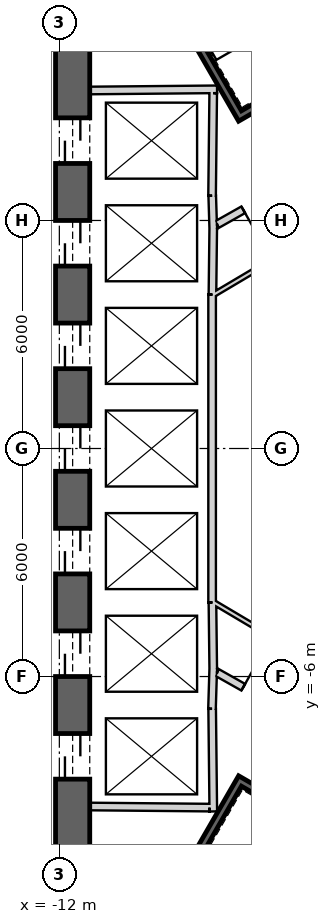
"""IFC4 building model, lengths in metres.
Left out: names, types, materials, properties, quantities, classifications, styles, units other than length and angle.
Written with IfcOpenShell. Run it as: python <this file> out.ifc"""

import sys

from ifc_helpers import new_model, si_unit, direction, frame, frame_2d, origin, place, context, subcontext, project, spatial, rectangle, extrude, element, fill, save


model = new_model("IFC4")
c1 = context("Model", 3, precision=1e-05, world=origin(), true_north=direction((0.0, 1.0)))
c2 = subcontext(c1, "Body", "Model", "MODEL_VIEW")
j1 = project(units=[si_unit("LENGTHUNIT", "METRE"), si_unit("PLANEANGLEUNIT", "RADIAN")], contexts=[c1])
p1 = place(None, origin())
s1 = spatial("IfcSite", under=j1, at=p1, CompositionType="ELEMENT")
p2 = place(p1, origin())
s2 = spatial("IfcBuilding", under=s1, at=p2, CompositionType="ELEMENT")
p3 = place(p2, frame((0.0, 0.0, 193.2)))
s3 = spatial("IfcBuildingStorey", under=s2, at=p3, CompositionType="ELEMENT", Elevation=193.2)
p4 = place(p3, frame((19.475, 2.208, 0.0), z_axis=(0.0, 0.0, 1.0), x_axis=(-0.866028369851, 0.499994862586, 0.0)))
e1 = element("IfcWall", 1, at=p4, inside=s3, PredefinedType="SHEAR", context=c2, shape_type="SweptSolid", body=[
    extrude(rectangle(XDim=31.523, YDim=0.9, at=frame_2d((15.762, 0.0))), origin(), (0.0, 0.0, 1.0), 4.0),
])
p5 = place(p4, frame((7.062, 0.0, 0.0)))
e2 = element("IfcOpeningElement", 2, at=p5, cuts=e1, PredefinedType="OPENING", context=c2, shape_type="SweptSolid", body=[
    extrude(rectangle(XDim=1.2, YDim=2.4, at=frame_2d((0.6, 1.2))), frame((0.0, 0.46, 0.0), z_axis=(0.0, -1.0, 0.0), x_axis=(1.0, 0.0, 0.0)), (0.0, 0.0, 1.0), 0.92),
])
p6 = place(p4, frame((3.612, 0.0, 0.0)))
e3 = element("IfcOpeningElement", 3, at=p6, cuts=e1, PredefinedType="OPENING", context=c2, shape_type="SweptSolid", body=[
    extrude(rectangle(XDim=1.2, YDim=2.4, at=frame_2d((0.6, 1.2))), frame((0.0, 0.46, 0.0), z_axis=(0.0, -1.0, 0.0), x_axis=(1.0, 0.0, 0.0)), (0.0, 0.0, 1.0), 0.92),
])
p7 = place(p4, frame((26.712, 0.0, 0.0)))
e4 = element("IfcOpeningElement", 4, at=p7, cuts=e1, PredefinedType="OPENING", context=c2, shape_type="SweptSolid", body=[
    extrude(rectangle(XDim=1.2, YDim=2.4, at=frame_2d((0.6, 1.2))), frame((0.0, 0.46, 0.0), z_axis=(0.0, -1.0, 0.0), x_axis=(1.0, 0.0, 0.0)), (0.0, 0.0, 1.0), 0.92),
])
p8 = place(p3, frame((-11.65, 15.762, 0.0), z_axis=(0.0, 0.0, 1.0), x_axis=(0.0, -1.0, 0.0)))
e5 = element("IfcWall", 5, at=p8, inside=s3, PredefinedType="SHEAR", context=c2, shape_type="SweptSolid", body=[
    extrude(rectangle(XDim=31.523, YDim=0.9, at=frame_2d((15.762, 0.0))), origin(), (0.0, 0.0, 1.0), 4.0),
])
p9 = place(p8, frame((7.062, 0.0, 0.0)))
e6 = element("IfcOpeningElement", 6, at=p9, cuts=e5, PredefinedType="OPENING", context=c2, shape_type="SweptSolid", body=[
    extrude(rectangle(XDim=1.2, YDim=2.4, at=frame_2d((0.6, 1.2))), frame((0.0, 0.46, 0.0), z_axis=(0.0, -1.0, 0.0), x_axis=(1.0, 0.0, 0.0)), (0.0, 0.0, 1.0), 0.92),
])
p10 = place(p8, frame((9.762, 0.0, 0.0)))
e7 = element("IfcOpeningElement", 7, at=p10, cuts=e5, PredefinedType="OPENING", context=c2, shape_type="SweptSolid", body=[
    extrude(rectangle(XDim=1.2, YDim=2.4, at=frame_2d((0.6, 1.2))), frame((0.0, 0.46, 0.0), z_axis=(0.0, -1.0, 0.0), x_axis=(1.0, 0.0, 0.0)), (0.0, 0.0, 1.0), 0.92),
])
p11 = place(p8, frame((12.462, 0.0, 0.0)))
e8 = element("IfcOpeningElement", 8, at=p11, cuts=e5, PredefinedType="OPENING", context=c2, shape_type="SweptSolid", body=[
    extrude(rectangle(XDim=1.2, YDim=2.4, at=frame_2d((0.6, 1.2))), frame((0.0, 0.46, 0.0), z_axis=(0.0, -1.0, 0.0), x_axis=(1.0, 0.0, 0.0)), (0.0, 0.0, 1.0), 0.92),
])
p12 = place(p8, frame((15.162, 0.0, 0.0)))
e9 = element("IfcOpeningElement", 9, at=p12, cuts=e5, PredefinedType="OPENING", context=c2, shape_type="SweptSolid", body=[
    extrude(rectangle(XDim=1.2, YDim=2.4, at=frame_2d((0.6, 1.2))), frame((0.0, 0.46, 0.0), z_axis=(0.0, -1.0, 0.0), x_axis=(1.0, 0.0, 0.0)), (0.0, 0.0, 1.0), 0.92),
])
p13 = place(p8, frame((17.862, 0.0, 0.0)))
e10 = element("IfcOpeningElement", 10, at=p13, cuts=e5, PredefinedType="OPENING", context=c2, shape_type="SweptSolid", body=[
    extrude(rectangle(XDim=1.2, YDim=2.4, at=frame_2d((0.6, 1.2))), frame((0.0, 0.46, 0.0), z_axis=(0.0, -1.0, 0.0), x_axis=(1.0, 0.0, 0.0)), (0.0, 0.0, 1.0), 0.92),
])
p14 = place(p8, frame((20.562, 0.0, 0.0)))
e11 = element("IfcOpeningElement", 11, at=p14, cuts=e5, PredefinedType="OPENING", context=c2, shape_type="SweptSolid", body=[
    extrude(rectangle(XDim=1.2, YDim=2.4, at=frame_2d((0.6, 1.2))), frame((0.0, 0.46, 0.0), z_axis=(0.0, -1.0, 0.0), x_axis=(1.0, 0.0, 0.0)), (0.0, 0.0, 1.0), 0.92),
])
p15 = place(p8, frame((23.262, 0.0, 0.0)))
e12 = element("IfcOpeningElement", 12, at=p15, cuts=e5, PredefinedType="OPENING", context=c2, shape_type="SweptSolid", body=[
    extrude(rectangle(XDim=1.2, YDim=2.4, at=frame_2d((0.6, 1.2))), frame((0.0, 0.46, 0.0), z_axis=(0.0, -1.0, 0.0), x_axis=(1.0, 0.0, 0.0)), (0.0, 0.0, 1.0), 0.92),
])
p16 = place(p8, frame((3.612, 0.0, 0.0)))
e13 = element("IfcOpeningElement", 13, at=p16, cuts=e5, PredefinedType="OPENING", context=c2, shape_type="SweptSolid", body=[
    extrude(rectangle(XDim=1.2, YDim=2.4, at=frame_2d((0.6, 1.2))), frame((0.0, 0.46, 0.0), z_axis=(0.0, -1.0, 0.0), x_axis=(1.0, 0.0, 0.0)), (0.0, 0.0, 1.0), 0.92),
])
p17 = place(p8, frame((26.712, 0.0, 0.0)))
e14 = element("IfcOpeningElement", 14, at=p17, cuts=e5, PredefinedType="OPENING", context=c2, shape_type="SweptSolid", body=[
    extrude(rectangle(XDim=1.2, YDim=2.4, at=frame_2d((0.6, 1.2))), frame((0.0, 0.46, 0.0), z_axis=(0.0, -1.0, 0.0), x_axis=(1.0, 0.0, 0.0)), (0.0, 0.0, 1.0), 0.92),
])
p18 = place(p3, frame((-7.825, -17.97, 0.0), z_axis=(0.0, 0.0, 1.0), x_axis=(0.866028369851, 0.499994862586, 0.0)))
e15 = element("IfcWall", 15, at=p18, inside=s3, PredefinedType="SHEAR", context=c2, shape_type="SweptSolid", body=[
    extrude(rectangle(XDim=31.523, YDim=0.9, at=frame_2d((15.762, 0.0))), origin(), (0.0, 0.0, 1.0), 4.0),
])
p19 = place(p18, frame((7.062, 0.0, 0.0)))
e16 = element("IfcOpeningElement", 16, at=p19, cuts=e15, PredefinedType="OPENING", context=c2, shape_type="SweptSolid", body=[
    extrude(rectangle(XDim=1.2, YDim=2.4, at=frame_2d((0.6, 1.2))), frame((0.0, 0.46, 0.0), z_axis=(0.0, -1.0, 0.0), x_axis=(1.0, 0.0, 0.0)), (0.0, 0.0, 1.0), 0.92),
])
p20 = place(p18, frame((9.762, 0.0, 0.0)))
e17 = element("IfcOpeningElement", 17, at=p20, cuts=e15, PredefinedType="OPENING", context=c2, shape_type="SweptSolid", body=[
    extrude(rectangle(XDim=1.2, YDim=2.4, at=frame_2d((0.6, 1.2))), frame((0.0, 0.46, 0.0), z_axis=(0.0, -1.0, 0.0), x_axis=(1.0, 0.0, 0.0)), (0.0, 0.0, 1.0), 0.92),
])
p21 = place(p18, frame((12.462, 0.0, 0.0)))
e18 = element("IfcOpeningElement", 18, at=p21, cuts=e15, PredefinedType="OPENING", context=c2, shape_type="SweptSolid", body=[
    extrude(rectangle(XDim=1.2, YDim=2.4, at=frame_2d((0.6, 1.2))), frame((0.0, 0.46, 0.0), z_axis=(0.0, -1.0, 0.0), x_axis=(1.0, 0.0, 0.0)), (0.0, 0.0, 1.0), 0.92),
])
p22 = place(p18, frame((15.162, 0.0, 0.0)))
e19 = element("IfcOpeningElement", 19, at=p22, cuts=e15, PredefinedType="OPENING", context=c2, shape_type="SweptSolid", body=[
    extrude(rectangle(XDim=1.2, YDim=2.4, at=frame_2d((0.6, 1.2))), frame((0.0, 0.46, 0.0), z_axis=(0.0, -1.0, 0.0), x_axis=(1.0, 0.0, 0.0)), (0.0, 0.0, 1.0), 0.92),
])
p23 = place(p18, frame((17.862, 0.0, 0.0)))
e20 = element("IfcOpeningElement", 20, at=p23, cuts=e15, PredefinedType="OPENING", context=c2, shape_type="SweptSolid", body=[
    extrude(rectangle(XDim=1.2, YDim=2.4, at=frame_2d((0.6, 1.2))), frame((0.0, 0.46, 0.0), z_axis=(0.0, -1.0, 0.0), x_axis=(1.0, 0.0, 0.0)), (0.0, 0.0, 1.0), 0.92),
])
p24 = place(p18, frame((20.562, 0.0, 0.0)))
e21 = element("IfcOpeningElement", 21, at=p24, cuts=e15, PredefinedType="OPENING", context=c2, shape_type="SweptSolid", body=[
    extrude(rectangle(XDim=1.2, YDim=2.4, at=frame_2d((0.6, 1.2))), frame((0.0, 0.46, 0.0), z_axis=(0.0, -1.0, 0.0), x_axis=(1.0, 0.0, 0.0)), (0.0, 0.0, 1.0), 0.92),
])
p25 = place(p18, frame((26.712, 0.0, 0.0)))
e22 = element("IfcOpeningElement", 22, at=p25, cuts=e15, PredefinedType="OPENING", context=c2, shape_type="SweptSolid", body=[
    extrude(rectangle(XDim=1.2, YDim=2.4, at=frame_2d((0.6, 1.2))), frame((0.0, 0.46, 0.0), z_axis=(0.0, -1.0, 0.0), x_axis=(1.0, 0.0, 0.0)), (0.0, 0.0, 1.0), 0.92),
])
p26 = place(p18, frame((3.612, 0.0, 0.0)))
e23 = element("IfcOpeningElement", 23, at=p26, cuts=e15, PredefinedType="OPENING", context=c2, shape_type="SweptSolid", body=[
    extrude(rectangle(XDim=1.2, YDim=2.4, at=frame_2d((0.6, 1.2))), frame((0.0, 0.46, 0.0), z_axis=(0.0, -1.0, 0.0), x_axis=(1.0, 0.0, 0.0)), (0.0, 0.0, 1.0), 0.92),
])
p27 = place(p3, frame((-11.2, 9.42, 0.0), z_axis=(0.0, 0.0, 1.0), x_axis=(0.999957167047, 0.009255488683, 0.0)))
e24 = element("IfcWall", 24, at=p27, inside=s3, PredefinedType="PLUMBINGWALL", context=c2, shape_type="SweptSolid", body=[
    extrude(rectangle(XDim=3.35, YDim=0.2, at=frame_2d((1.675, 0.0))), origin(), (0.0, 0.0, 1.0), 3.7),
])
p28 = place(p3, frame((-7.951, 9.35, 0.0), z_axis=(0.0, 0.0, 1.0), x_axis=(-0.011120469654, -0.999938165666, 0.0)))
e25 = element("IfcWall", 25, at=p28, inside=s3, PredefinedType="PLUMBINGWALL", context=c2, shape_type="SweptSolid", body=[
    extrude(rectangle(XDim=2.7, YDim=0.2, at=frame_2d((1.35, 0.0))), origin(), (0.0, 0.0, 1.0), 3.7),
])
p29 = place(p3, frame((-7.977, 6.65, 0.0), z_axis=(0.0, 0.0, 1.0), x_axis=(0.030861509705, -0.999523670164, 0.0)))
e26 = element("IfcWall", 26, at=p29, inside=s3, PredefinedType="PLUMBINGWALL", context=c2, shape_type="SweptSolid", body=[
    extrude(rectangle(XDim=0.878, YDim=0.2, at=frame_2d((0.439, 0.0))), origin(), (0.0, 0.0, 1.0), 3.7),
])
p30 = place(p3, frame((-7.949, 5.895, 0.0), z_axis=(0.0, 0.0, 1.0), x_axis=(-0.012042535896, -0.999927486035, 0.0)))
e27 = element("IfcWall", 27, at=p30, inside=s3, PredefinedType="PLUMBINGWALL", context=c2, shape_type="SweptSolid", body=[
    extrude(rectangle(XDim=1.845, YDim=0.2, at=frame_2d((0.922, 0.0))), origin(), (0.0, 0.0, 1.0), 3.7),
])
p31 = place(p3, frame((-7.98, 4.05, 0.0), z_axis=(0.0, 0.0, 1.0), x_axis=(0.0, -1.0, 0.0)))
e28 = element("IfcWall", 28, at=p31, inside=s3, PredefinedType="PLUMBINGWALL", context=c2, shape_type="SweptSolid", body=[
    extrude(rectangle(XDim=8.1, YDim=0.2, at=frame_2d((4.05, 0.0))), origin(), (0.0, 0.0, 1.0), 3.7),
])
p32 = place(p3, frame((-7.95, -5.772, 0.0), z_axis=(0.0, 0.0, 1.0), x_axis=(-0.030803413295, -0.999525462272, 0.0)))
e29 = element("IfcWall", 29, at=p32, inside=s3, PredefinedType="PLUMBINGWALL", context=c2, shape_type="SweptSolid", body=[
    extrude(rectangle(XDim=1.078, YDim=0.2, at=frame_2d((0.539, 0.0))), origin(), (0.0, 0.0, 1.0), 3.7),
])
p33 = place(p3, frame((-7.971, -4.05, 0.0), z_axis=(0.0, 0.0, 1.0), x_axis=(0.012042535896, -0.999927486035, 0.0)))
e30 = element("IfcWall", 30, at=p33, inside=s3, PredefinedType="PLUMBINGWALL", context=c2, shape_type="SweptSolid", body=[
    extrude(rectangle(XDim=1.845, YDim=0.2, at=frame_2d((0.922, 0.0))), origin(), (0.0, 0.0, 1.0), 3.7),
])
p34 = place(p3, frame((-7.979, -6.85, 0.0), z_axis=(0.0, 0.0, 1.0), x_axis=(0.011121475088, -0.999938154483, 0.0)))
e31 = element("IfcWall", 31, at=p34, inside=s3, PredefinedType="PLUMBINGWALL", context=c2, shape_type="SweptSolid", body=[
    extrude(rectangle(XDim=2.7, YDim=0.2, at=frame_2d((1.35, 0.0))), origin(), (0.0, 0.0, 1.0), 3.7),
])
p35 = place(p3, frame((-8.05, -9.449, 0.0), z_axis=(0.0, 0.0, 1.0), x_axis=(-0.999957467379, 0.009222983926, 0.0)))
e32 = element("IfcWall", 32, at=p35, inside=s3, PredefinedType="PLUMBINGWALL", context=c2, shape_type="SweptSolid", body=[
    extrude(rectangle(XDim=3.15, YDim=0.2, at=frame_2d((1.575, 0.0))), origin(), (0.0, 0.0, 1.0), 3.7),
])
p36 = place(p3, frame((-11.245, 15.678, -0.3), z_axis=(0.0, 0.0, 1.0), x_axis=(0.499977274689, -0.866038523851, 0.0)))
e33 = element("IfcWall", 33, at=p36, inside=s3, PredefinedType="SHEAR", context=c2, shape_type="SweptSolid", body=[
    extrude(rectangle(XDim=8.1, YDim=0.2, at=frame_2d((4.05, 0.0))), origin(), (0.0, 0.0, 1.0), 4.0),
])
p37 = place(p3, frame((-7.159, 8.8, -0.3), z_axis=(0.0, 0.0, 1.0), x_axis=(0.866047807691, 0.499961193289, 0.0)))
e34 = element("IfcWall", 34, at=p37, inside=s3, PredefinedType="SHEAR", context=c2, shape_type="SweptSolid", body=[
    extrude(rectangle(XDim=3.6, YDim=0.2, at=frame_2d((1.8, 0.0))), origin(), (0.0, 0.0, 1.0), 4.0),
])
p38 = place(p37, frame((1.25, 0.0, 0.3)))
e35 = element("IfcOpeningElement", 35, at=p38, cuts=e34, PredefinedType="OPENING", context=c2, shape_type="SweptSolid", body=[
    extrude(rectangle(XDim=1.1, YDim=2.1, at=frame_2d((0.55, 1.05))), frame((0.0, 0.11, 0.0), z_axis=(0.0, -1.0, 0.0), x_axis=(1.0, 0.0, 0.0)), (0.0, 0.0, 1.0), 0.22),
])
p39 = place(p3, frame((-7.196, -8.663, -0.3), z_axis=(0.0, 0.0, 1.0), x_axis=(-0.499997992926, -0.866026562566, 0.0)))
e36 = element("IfcWall", 36, at=p39, inside=s3, PredefinedType="SHEAR", context=c2, shape_type="SweptSolid", body=[
    extrude(rectangle(XDim=7.9, YDim=0.2, at=frame_2d((3.95, 0.0))), origin(), (0.0, 0.0, 1.0), 4.0),
])
p40 = place(p3, frame((-4.041, -10.599, -0.3), z_axis=(0.0, 0.0, 1.0), x_axis=(-0.866047807691, 0.499961193289, 0.0)))
e37 = element("IfcWall", 37, at=p40, inside=s3, PredefinedType="SHEAR", context=c2, shape_type="SweptSolid", body=[
    extrude(rectangle(XDim=3.6, YDim=0.2, at=frame_2d((1.8, 0.0))), origin(), (0.0, 0.0, 1.0), 4.0),
])
p41 = place(p40, frame((1.25, 0.0, 0.3)))
e38 = element("IfcOpeningElement", 38, at=p41, cuts=e37, PredefinedType="OPENING", context=c2, shape_type="SweptSolid", body=[
    extrude(rectangle(XDim=1.1, YDim=2.1, at=frame_2d((0.55, 1.05))), frame((0.0, 0.11, 0.0), z_axis=(0.0, -1.0, 0.0), x_axis=(1.0, 0.0, 0.0)), (0.0, 0.0, 1.0), 0.22),
])
p42 = place(p3, frame((-5.6, 7.16, 0.0), z_axis=(0.0, 0.0, 1.0), x_axis=(-0.871363259478, -0.490638431059, 0.0)))
e39 = element("IfcWall", 39, at=p42, inside=s3, PredefinedType="PARTITIONING", context=c2, shape_type="SweptSolid", body=[
    extrude(rectangle(XDim=2.581, YDim=0.2, at=frame_2d((1.291, 0.0))), origin(), (0.0, 0.0, 1.0), 3.7),
])
p43 = place(p42, frame((0.791, 0.0, 0.0)))
e40 = element("IfcOpeningElement", 40, at=p43, cuts=e39, PredefinedType="OPENING", context=c2, shape_type="SweptSolid", body=[
    extrude(rectangle(XDim=1.0, YDim=2.1, at=frame_2d((0.5, 1.05))), frame((0.0, 0.11, 0.0), z_axis=(0.0, -1.0, 0.0), x_axis=(1.0, 0.0, 0.0)), (0.0, 0.0, 1.0), 0.22),
])
p44 = place(p3, frame((-7.849, -5.894, 0.0), z_axis=(0.0, 0.0, 1.0), x_axis=(0.871363259478, -0.490638431059, 0.0)))
e41 = element("IfcWall", 41, at=p44, inside=s3, PredefinedType="PARTITIONING", context=c2, shape_type="SweptSolid", body=[
    extrude(rectangle(XDim=2.581, YDim=0.2, at=frame_2d((1.291, 0.0))), origin(), (0.0, 0.0, 1.0), 3.7),
])
p45 = place(p44, frame((0.791, 0.0, 0.0)))
e42 = element("IfcOpeningElement", 42, at=p45, cuts=e41, PredefinedType="OPENING", context=c2, shape_type="SweptSolid", body=[
    extrude(rectangle(XDim=1.0, YDim=2.1, at=frame_2d((0.5, 1.05))), frame((0.0, 0.11, 0.0), z_axis=(0.0, -1.0, 0.0), x_axis=(1.0, 0.0, 0.0)), (0.0, 0.0, 1.0), 0.22),
])
p46 = place(p3, frame((-7.95, -4.041, 0.0), z_axis=(0.0, 0.0, 1.0), x_axis=(0.860112457103, -0.510104461004, 0.0)))
e43 = element("IfcWall", 43, at=p46, inside=s3, PredefinedType="PARTITIONING", context=c2, shape_type="SweptSolid", body=[
    extrude(rectangle(XDim=2.104, YDim=0.12, at=frame_2d((1.052, 0.0))), origin(), (0.0, 0.0, 1.0), 3.7),
])
p47 = place(p3, frame((-6.037, 5.176, 0.0), z_axis=(0.0, 0.0, 1.0), x_axis=(-0.860106072674, -0.510115225953, 0.0)))
e44 = element("IfcWall", 44, at=p47, inside=s3, PredefinedType="PARTITIONING", context=c2, shape_type="SweptSolid", body=[
    extrude(rectangle(XDim=2.225, YDim=0.12, at=frame_2d((1.112, 0.0))), origin(), (0.0, 0.0, 1.0), 3.7),
])
p48 = place(p43, origin())
e45 = element("IfcDoor", 45, at=p48, inside=s3, OperationType="SINGLE_SWING_LEFT", PredefinedType="USERDEFINED", context=c2, shape_type="SweptSolid", body=[
    extrude(rectangle(XDim=1.0, YDim=2.1, at=frame_2d((0.5, 1.05))), frame((0.0, 0.025, 0.0), z_axis=(0.0, -1.0, 0.0), x_axis=(1.0, 0.0, 0.0)), (0.0, 0.0, 1.0), 0.05),
])
fill(e40, e45)
p49 = place(p45, origin())
e46 = element("IfcDoor", 46, at=p49, inside=s3, OperationType="SINGLE_SWING_LEFT", PredefinedType="USERDEFINED", context=c2, shape_type="SweptSolid", body=[
    extrude(rectangle(XDim=1.0, YDim=2.1, at=frame_2d((0.5, 1.05))), frame((0.0, 0.025, 0.0), z_axis=(0.0, -1.0, 0.0), x_axis=(1.0, 0.0, 0.0)), (0.0, 0.0, 1.0), 0.05),
])
fill(e42, e46)
p50 = place(p9, origin())
e47 = element("IfcDoor", 47, at=p50, inside=s3, OperationType="SLIDING_TO_LEFT", PredefinedType="USERDEFINED", context=c2, shape_type="SweptSolid", body=[
    extrude(rectangle(XDim=1.2, YDim=2.4, at=frame_2d((0.6, 1.2))), frame((0.0, 0.025, 0.0), z_axis=(0.0, -1.0, 0.0), x_axis=(1.0, 0.0, 0.0)), (0.0, 0.0, 1.0), 0.05),
])
fill(e6, e47)
p51 = place(p10, origin())
e48 = element("IfcDoor", 48, at=p51, inside=s3, OperationType="SLIDING_TO_LEFT", PredefinedType="USERDEFINED", context=c2, shape_type="SweptSolid", body=[
    extrude(rectangle(XDim=1.2, YDim=2.4, at=frame_2d((0.6, 1.2))), frame((0.0, 0.025, 0.0), z_axis=(0.0, -1.0, 0.0), x_axis=(1.0, 0.0, 0.0)), (0.0, 0.0, 1.0), 0.05),
])
fill(e7, e48)
p52 = place(p11, origin())
e49 = element("IfcDoor", 49, at=p52, inside=s3, OperationType="SLIDING_TO_LEFT", PredefinedType="USERDEFINED", context=c2, shape_type="SweptSolid", body=[
    extrude(rectangle(XDim=1.2, YDim=2.4, at=frame_2d((0.6, 1.2))), frame((0.0, 0.025, 0.0), z_axis=(0.0, -1.0, 0.0), x_axis=(1.0, 0.0, 0.0)), (0.0, 0.0, 1.0), 0.05),
])
fill(e8, e49)
p53 = place(p12, origin())
e50 = element("IfcDoor", 50, at=p53, inside=s3, OperationType="SLIDING_TO_LEFT", PredefinedType="USERDEFINED", context=c2, shape_type="SweptSolid", body=[
    extrude(rectangle(XDim=1.2, YDim=2.4, at=frame_2d((0.6, 1.2))), frame((0.0, 0.025, 0.0), z_axis=(0.0, -1.0, 0.0), x_axis=(1.0, 0.0, 0.0)), (0.0, 0.0, 1.0), 0.05),
])
fill(e9, e50)
p54 = place(p13, origin())
e51 = element("IfcDoor", 51, at=p54, inside=s3, OperationType="SLIDING_TO_LEFT", PredefinedType="USERDEFINED", context=c2, shape_type="SweptSolid", body=[
    extrude(rectangle(XDim=1.2, YDim=2.4, at=frame_2d((0.6, 1.2))), frame((0.0, 0.025, 0.0), z_axis=(0.0, -1.0, 0.0), x_axis=(1.0, 0.0, 0.0)), (0.0, 0.0, 1.0), 0.05),
])
fill(e10, e51)
p55 = place(p14, origin())
e52 = element("IfcDoor", 52, at=p55, inside=s3, OperationType="SLIDING_TO_LEFT", PredefinedType="USERDEFINED", context=c2, shape_type="SweptSolid", body=[
    extrude(rectangle(XDim=1.2, YDim=2.4, at=frame_2d((0.6, 1.2))), frame((0.0, 0.025, 0.0), z_axis=(0.0, -1.0, 0.0), x_axis=(1.0, 0.0, 0.0)), (0.0, 0.0, 1.0), 0.05),
])
fill(e11, e52)
p56 = place(p15, origin())
e53 = element("IfcDoor", 53, at=p56, inside=s3, OperationType="SLIDING_TO_LEFT", PredefinedType="USERDEFINED", context=c2, shape_type="SweptSolid", body=[
    extrude(rectangle(XDim=1.2, YDim=2.4, at=frame_2d((0.6, 1.2))), frame((0.0, 0.025, 0.0), z_axis=(0.0, -1.0, 0.0), x_axis=(1.0, 0.0, 0.0)), (0.0, 0.0, 1.0), 0.05),
])
fill(e12, e53)
save(model, sys.argv[1])
